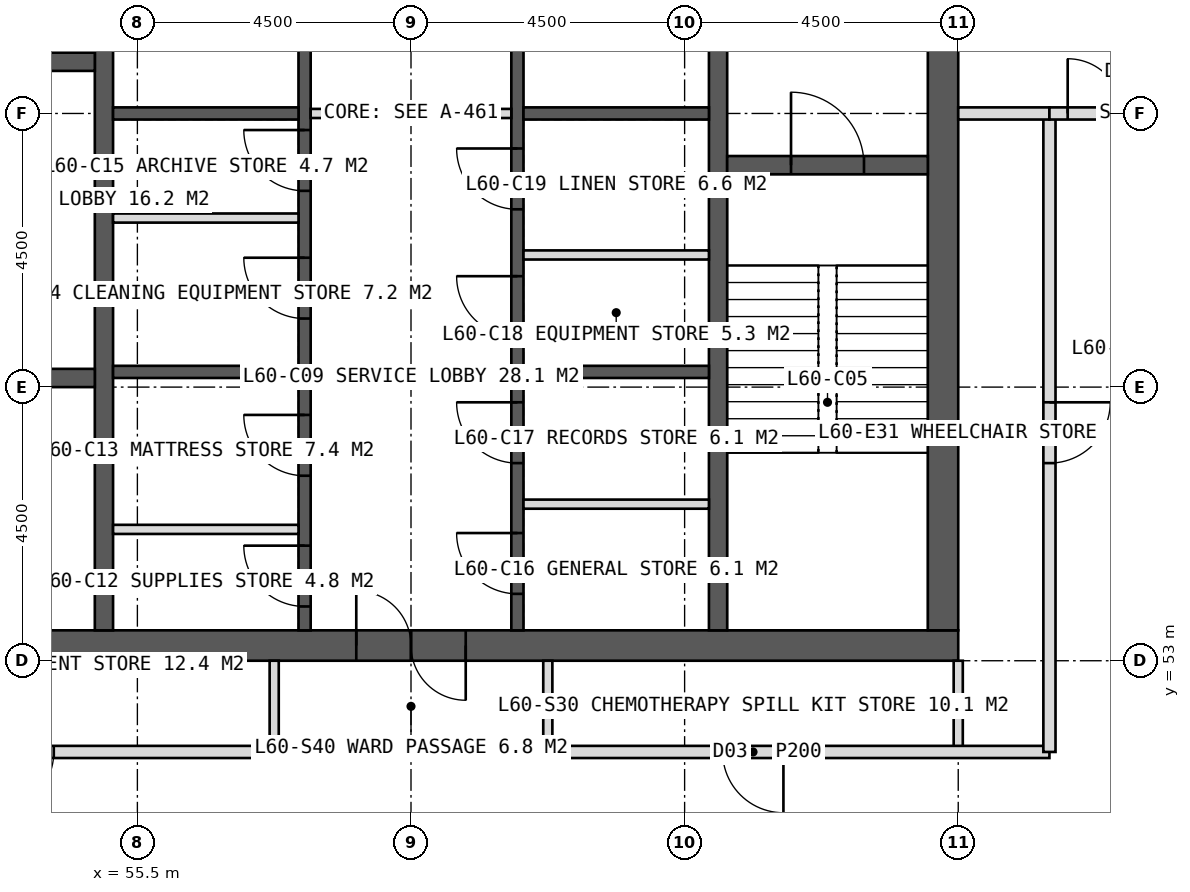
"""IFC4 building model, lengths in metres.
Left out: names, types, materials, properties, quantities, classifications, styles, units other than length and angle.
Written with IfcOpenShell. Run it as: python <this file> out.ifc"""

import sys

from ifc_helpers import new_model, si_unit, direction, frame, frame_2d, origin, place, context, subcontext, project, spatial, rectangle, extrude, element, fill, save


model = new_model("IFC4")
c1 = context("Model", 3, precision=1e-05, world=origin(), true_north=direction((0.0, 1.0)))
c2 = subcontext(c1, "Body", "Model", "MODEL_VIEW")
j1 = project(units=[si_unit("LENGTHUNIT", "METRE"), si_unit("PLANEANGLEUNIT", "RADIAN")], contexts=[c1])
p1 = place(None, origin())
s1 = spatial("IfcSite", under=j1, at=p1, CompositionType="ELEMENT")
p2 = place(p1, origin())
s2 = spatial("IfcBuilding", under=s1, at=p2, CompositionType="ELEMENT")
p3 = place(p2, frame((0.0, 0.0, 250.0)))
s3 = spatial("IfcBuildingStorey", under=s2, at=p3, CompositionType="ELEMENT", Elevation=250.0)
p4 = place(p3, frame((51.0, 53.25, 0.0), z_axis=(0.0, 0.0, 1.0), x_axis=(1.0, 0.0, 0.0)))
e1 = element("IfcWall", 1, at=p4, inside=s3, PredefinedType="SHEAR", context=c2, shape_type="SweptSolid", body=[
    extrude(rectangle(XDim=18.0, YDim=0.5, at=frame_2d((9.0, 0.0))), origin(), (0.0, 0.0, 1.0), 4.0),
])
p5 = place(p4, frame((8.1, 0.0, 0.0)))
e2 = element("IfcOpeningElement", 2, at=p5, cuts=e1, PredefinedType="OPENING", context=c2, shape_type="SweptSolid", body=[
    extrude(rectangle(XDim=1.8, YDim=2.2, at=frame_2d((0.9, 1.1))), frame((0.0, 0.26, 0.0), z_axis=(0.0, -1.0, 0.0), x_axis=(1.0, 0.0, 0.0)), (0.0, 0.0, 1.0), 0.52),
])
p6 = place(p3, frame((68.75, 53.5, 0.0), z_axis=(0.0, 0.0, 1.0), x_axis=(0.0, 1.0, 0.0)))
e3 = element("IfcWall", 3, at=p6, inside=s3, PredefinedType="SHEAR", context=c2, shape_type="SweptSolid", body=[
    extrude(rectangle(XDim=17.0, YDim=0.5, at=frame_2d((8.5, 0.0))), origin(), (0.0, 0.0, 1.0), 4.0),
])
p7 = place(p6, frame((9.6, 0.0, 0.0)))
e4 = element("IfcOpeningElement", 4, at=p7, cuts=e3, PredefinedType="OPENING", context=c2, shape_type="SweptSolid", body=[
    extrude(rectangle(XDim=1.5, YDim=2.2, at=frame_2d((0.75, 1.1))), frame((0.0, 0.26, 0.0), z_axis=(0.0, -1.0, 0.0), x_axis=(1.0, 0.0, 0.0)), (0.0, 0.0, 1.0), 0.52),
])
for number, where, z_axis, x_axis in (
    (5, (54.95, 53.5, 0.0), (0.0, 0.0, 1.0), (0.0, 1.0, 0.0)),
    (6, (65.05, 53.5, 0.0), (0.0, 0.0, 1.0), (0.0, 1.0, 0.0)),
):
    element("IfcWall", number, at=place(p3, frame(where, z_axis=z_axis, x_axis=x_axis)), inside=s3, PredefinedType="SHEAR", context=c2, shape_type="SweptSolid", body=[
        extrude(rectangle(XDim=17.0, YDim=0.3, at=frame_2d((8.5, 0.0))), origin(), (0.0, 0.0, 1.0), 4.0),
    ])
p8 = place(p3, frame((58.25, 53.5, 0.0), z_axis=(0.0, 0.0, 1.0), x_axis=(0.0, 1.0, 0.0)))
e7 = element("IfcWall", 7, at=p8, inside=s3, PredefinedType="SHEAR", context=c2, shape_type="SweptSolid", body=[
    extrude(rectangle(XDim=17.0, YDim=0.2, at=frame_2d((8.5, 0.0))), origin(), (0.0, 0.0, 1.0), 4.0),
])
p9 = place(p8, frame((0.393, 0.0, 0.0)))
e8 = element("IfcOpeningElement", 8, at=p9, cuts=e7, PredefinedType="OPENING", context=c2, shape_type="SweptSolid", body=[
    extrude(rectangle(XDim=1.0, YDim=2.1, at=frame_2d((0.5, 1.05))), frame((0.0, 0.11, 0.0), z_axis=(0.0, -1.0, 0.0), x_axis=(1.0, 0.0, 0.0)), (0.0, 0.0, 1.0), 0.22),
])
p10 = place(p8, frame((2.542, 0.0, 0.0)))
e9 = element("IfcOpeningElement", 9, at=p10, cuts=e7, PredefinedType="OPENING", context=c2, shape_type="SweptSolid", body=[
    extrude(rectangle(XDim=1.0, YDim=2.1, at=frame_2d((0.5, 1.05))), frame((0.0, 0.11, 0.0), z_axis=(0.0, -1.0, 0.0), x_axis=(1.0, 0.0, 0.0)), (0.0, 0.0, 1.0), 0.22),
])
p11 = place(p8, frame((5.127, 0.0, 0.0)))
e10 = element("IfcOpeningElement", 10, at=p11, cuts=e7, PredefinedType="OPENING", context=c2, shape_type="SweptSolid", body=[
    extrude(rectangle(XDim=1.0, YDim=2.1, at=frame_2d((0.5, 1.05))), frame((0.0, 0.11, 0.0), z_axis=(0.0, -1.0, 0.0), x_axis=(1.0, 0.0, 0.0)), (0.0, 0.0, 1.0), 0.22),
])
p12 = place(p8, frame((7.228, 0.0, 0.0)))
e11 = element("IfcOpeningElement", 11, at=p12, cuts=e7, PredefinedType="OPENING", context=c2, shape_type="SweptSolid", body=[
    extrude(rectangle(XDim=1.0, YDim=2.1, at=frame_2d((0.5, 1.05))), frame((0.0, 0.11, 0.0), z_axis=(0.0, -1.0, 0.0), x_axis=(1.0, 0.0, 0.0)), (0.0, 0.0, 1.0), 0.22),
])
p13 = place(p8, frame((10.025, 0.0, 0.0)))
e12 = element("IfcOpeningElement", 12, at=p13, cuts=e7, PredefinedType="OPENING", context=c2, shape_type="SweptSolid", body=[
    extrude(rectangle(XDim=1.4, YDim=2.2, at=frame_2d((0.7, 1.1))), frame((0.0, 0.11, 0.0), z_axis=(0.0, -1.0, 0.0), x_axis=(1.0, 0.0, 0.0)), (0.0, 0.0, 1.0), 0.22),
])
p14 = place(p8, frame((14.325, 0.0, 0.0)))
e13 = element("IfcOpeningElement", 13, at=p14, cuts=e7, PredefinedType="OPENING", context=c2, shape_type="SweptSolid", body=[
    extrude(rectangle(XDim=1.4, YDim=2.2, at=frame_2d((0.7, 1.1))), frame((0.0, 0.11, 0.0), z_axis=(0.0, -1.0, 0.0), x_axis=(1.0, 0.0, 0.0)), (0.0, 0.0, 1.0), 0.22),
])
p15 = place(p3, frame((61.75, 53.5, 0.0), z_axis=(0.0, 0.0, 1.0), x_axis=(0.0, 1.0, 0.0)))
e14 = element("IfcWall", 14, at=p15, inside=s3, PredefinedType="SHEAR", context=c2, shape_type="SweptSolid", body=[
    extrude(rectangle(XDim=17.0, YDim=0.2, at=frame_2d((8.5, 0.0))), origin(), (0.0, 0.0, 1.0), 4.0),
])
p16 = place(p15, frame((0.6, 0.0, 0.0)))
e15 = element("IfcOpeningElement", 15, at=p16, cuts=e14, PredefinedType="OPENING", context=c2, shape_type="SweptSolid", body=[
    extrude(rectangle(XDim=1.0, YDim=2.1, at=frame_2d((0.5, 1.05))), frame((0.0, 0.11, 0.0), z_axis=(0.0, -1.0, 0.0), x_axis=(1.0, 0.0, 0.0)), (0.0, 0.0, 1.0), 0.22),
])
p17 = place(p15, frame((2.75, 0.0, 0.0)))
e16 = element("IfcOpeningElement", 16, at=p17, cuts=e14, PredefinedType="OPENING", context=c2, shape_type="SweptSolid", body=[
    extrude(rectangle(XDim=1.0, YDim=2.1, at=frame_2d((0.5, 1.05))), frame((0.0, 0.11, 0.0), z_axis=(0.0, -1.0, 0.0), x_axis=(1.0, 0.0, 0.0)), (0.0, 0.0, 1.0), 0.22),
])
p18 = place(p15, frame((4.824, 0.0, 0.0)))
e17 = element("IfcOpeningElement", 17, at=p18, cuts=e14, PredefinedType="OPENING", context=c2, shape_type="SweptSolid", body=[
    extrude(rectangle(XDim=1.0, YDim=2.1, at=frame_2d((0.5, 1.05))), frame((0.0, 0.11, 0.0), z_axis=(0.0, -1.0, 0.0), x_axis=(1.0, 0.0, 0.0)), (0.0, 0.0, 1.0), 0.22),
])
p19 = place(p15, frame((6.924, 0.0, 0.0)))
e18 = element("IfcOpeningElement", 18, at=p19, cuts=e14, PredefinedType="OPENING", context=c2, shape_type="SweptSolid", body=[
    extrude(rectangle(XDim=1.0, YDim=2.1, at=frame_2d((0.5, 1.05))), frame((0.0, 0.11, 0.0), z_axis=(0.0, -1.0, 0.0), x_axis=(1.0, 0.0, 0.0)), (0.0, 0.0, 1.0), 0.22),
])
p20 = place(p15, frame((10.025, 0.0, 0.0)))
e19 = element("IfcOpeningElement", 19, at=p20, cuts=e14, PredefinedType="OPENING", context=c2, shape_type="SweptSolid", body=[
    extrude(rectangle(XDim=1.4, YDim=2.2, at=frame_2d((0.7, 1.1))), frame((0.0, 0.11, 0.0), z_axis=(0.0, -1.0, 0.0), x_axis=(1.0, 0.0, 0.0)), (0.0, 0.0, 1.0), 0.22),
])
p21 = place(p15, frame((14.325, 0.0, 0.0)))
e20 = element("IfcOpeningElement", 20, at=p21, cuts=e14, PredefinedType="OPENING", context=c2, shape_type="SweptSolid", body=[
    extrude(rectangle(XDim=1.4, YDim=2.2, at=frame_2d((0.7, 1.1))), frame((0.0, 0.11, 0.0), z_axis=(0.0, -1.0, 0.0), x_axis=(1.0, 0.0, 0.0)), (0.0, 0.0, 1.0), 0.22),
])
for number, where, z_axis, x_axis in (
    (21, (55.1, 57.75, 0.0), (0.0, 0.0, 1.0), (1.0, 0.0, 0.0)),
    (22, (61.85, 57.75, 0.0), (0.0, 0.0, 1.0), (1.0, 0.0, 0.0)),
    (23, (55.1, 62.0, 0.0), (0.0, 0.0, 1.0), (1.0, 0.0, 0.0)),
    (24, (61.85, 62.0, 0.0), (0.0, 0.0, 1.0), (1.0, 0.0, 0.0)),
):
    element("IfcWall", number, at=place(p3, frame(where, z_axis=z_axis, x_axis=x_axis)), inside=s3, PredefinedType="SHEAR", context=c2, shape_type="SweptSolid", body=[
        extrude(rectangle(XDim=3.05, YDim=0.2, at=frame_2d((1.525, 0.0))), origin(), (0.0, 0.0, 1.0), 4.0),
    ])
p22 = place(p3, frame((51.5, 62.85, 0.0), z_axis=(0.0, 0.0, 1.0), x_axis=(1.0, 0.0, 0.0)))
e25 = element("IfcWall", 25, at=p22, inside=s3, PredefinedType="SHEAR", context=c2, shape_type="SweptSolid", body=[
    extrude(rectangle(XDim=3.3, YDim=0.3, at=frame_2d((1.65, 0.0))), origin(), (0.0, 0.0, 1.0), 4.0),
])
p23 = place(p22, frame((1.15, 0.0, 0.0)))
e26 = element("IfcOpeningElement", 26, at=p23, cuts=e25, PredefinedType="OPENING", context=c2, shape_type="SweptSolid", body=[
    extrude(rectangle(XDim=1.2, YDim=2.1, at=frame_2d((0.6, 1.05))), frame((0.0, 0.16, 0.0), z_axis=(0.0, -1.0, 0.0), x_axis=(1.0, 0.0, 0.0)), (0.0, 0.0, 1.0), 0.32),
])
p24 = place(p3, frame((51.5, 57.65, 0.0), z_axis=(0.0, 0.0, 1.0), x_axis=(1.0, 0.0, 0.0)))
e27 = element("IfcWall", 27, at=p24, inside=s3, PredefinedType="SHEAR", context=c2, shape_type="SweptSolid", body=[
    extrude(rectangle(XDim=3.3, YDim=0.3, at=frame_2d((1.65, 0.0))), origin(), (0.0, 0.0, 1.0), 4.0),
])
p25 = place(p24, frame((1.15, 0.0, 0.0)))
e28 = element("IfcOpeningElement", 28, at=p25, cuts=e27, PredefinedType="OPENING", context=c2, shape_type="SweptSolid", body=[
    extrude(rectangle(XDim=1.2, YDim=2.2, at=frame_2d((0.6, 1.1))), frame((0.0, 0.16, 0.0), z_axis=(0.0, -1.0, 0.0), x_axis=(1.0, 0.0, 0.0)), (0.0, 0.0, 1.0), 0.32),
])
p26 = place(p3, frame((65.2, 61.15, 0.0), z_axis=(0.0, 0.0, 1.0), x_axis=(1.0, 0.0, 0.0)))
e29 = element("IfcWall", 29, at=p26, inside=s3, PredefinedType="SHEAR", context=c2, shape_type="SweptSolid", body=[
    extrude(rectangle(XDim=3.3, YDim=0.3, at=frame_2d((1.65, 0.0))), origin(), (0.0, 0.0, 1.0), 4.0),
])
p27 = place(p26, frame((1.05, 0.0, 0.0)))
e30 = element("IfcOpeningElement", 30, at=p27, cuts=e29, PredefinedType="OPENING", context=c2, shape_type="SweptSolid", body=[
    extrude(rectangle(XDim=1.2, YDim=2.1, at=frame_2d((0.6, 1.05))), frame((0.0, 0.16, 0.0), z_axis=(0.0, -1.0, 0.0), x_axis=(1.0, 0.0, 0.0)), (0.0, 0.0, 1.0), 0.32),
])
p28 = place(p3, frame((69.0, 53.0, 0.0), z_axis=(0.0, 0.0, 1.0), x_axis=(0.0, -1.0, 0.0)))
e31 = element("IfcWall", 31, at=p28, inside=s3, PredefinedType="PARTITIONING", context=c2, shape_type="SweptSolid", body=[
    extrude(rectangle(XDim=1.5, YDim=0.15, at=frame_2d((0.75, 0.0))), origin(), (0.0, 0.0, 1.0), 3.75),
])
p29 = place(p3, frame((70.5, 51.5, 0.0), z_axis=(0.0, 0.0, 1.0), x_axis=(-1.0, 0.0, 0.0)))
e32 = element("IfcWall", 32, at=p29, inside=s3, PredefinedType="PARTITIONING", context=c2, shape_type="SweptSolid", body=[
    extrude(rectangle(XDim=8.25, YDim=0.2, at=frame_2d((4.125, 0.0))), origin(), (0.0, 0.0, 1.0), 3.75),
])
p30 = place(p29, frame((4.375, 0.0, 0.0)))
e33 = element("IfcOpeningElement", 33, at=p30, cuts=e32, PredefinedType="OPENING", context=c2, shape_type="SweptSolid", body=[
    extrude(rectangle(XDim=1.0, YDim=2.1, at=frame_2d((0.5, 1.05))), frame((0.0, 0.11, 0.0), z_axis=(0.0, -1.0, 0.0), x_axis=(1.0, 0.0, 0.0)), (0.0, 0.0, 1.0), 0.22),
])
p31 = place(p3, frame((57.75, 51.5, 0.0), z_axis=(0.0, 0.0, 1.0), x_axis=(-1.0, 0.0, 0.0)))
e34 = element("IfcWall", 34, at=p31, inside=s3, PredefinedType="PARTITIONING", context=c2, shape_type="SweptSolid", body=[
    extrude(rectangle(XDim=8.25, YDim=0.2, at=frame_2d((4.125, 0.0))), origin(), (0.0, 0.0, 1.0), 3.75),
])
p32 = place(p31, frame((3.625, 0.0, 0.0)))
e35 = element("IfcOpeningElement", 35, at=p32, cuts=e34, PredefinedType="OPENING", context=c2, shape_type="SweptSolid", body=[
    extrude(rectangle(XDim=1.0, YDim=2.1, at=frame_2d((0.5, 1.05))), frame((0.0, 0.11, 0.0), z_axis=(0.0, -1.0, 0.0), x_axis=(1.0, 0.0, 0.0)), (0.0, 0.0, 1.0), 0.22),
])
for number, where, z_axis, x_axis in (
    (36, (62.25, 53.0, 0.0), (0.0, 0.0, 1.0), (0.0, -1.0, 0.0)),
    (37, (57.75, 53.0, 0.0), (0.0, 0.0, 1.0), (0.0, -1.0, 0.0)),
):
    element("IfcWall", number, at=place(p3, frame(where, z_axis=z_axis, x_axis=x_axis)), inside=s3, PredefinedType="PARTITIONING", context=c2, shape_type="SweptSolid", body=[
        extrude(rectangle(XDim=1.5, YDim=0.15, at=frame_2d((0.75, 0.0))), origin(), (0.0, 0.0, 1.0), 3.75),
    ])
p33 = place(p3, frame((70.5, 62.0, 0.0), z_axis=(0.0, 0.0, 1.0), x_axis=(0.0, -1.0, 0.0)))
e38 = element("IfcWall", 38, at=p33, inside=s3, PredefinedType="PARTITIONING", context=c2, shape_type="SweptSolid", body=[
    extrude(rectangle(XDim=10.5, YDim=0.2, at=frame_2d((5.25, 0.0))), origin(), (0.0, 0.0, 1.0), 3.75),
])
p34 = place(p33, frame((4.75, 0.0, 0.0)))
e39 = element("IfcOpeningElement", 39, at=p34, cuts=e38, PredefinedType="OPENING", context=c2, shape_type="SweptSolid", body=[
    extrude(rectangle(XDim=1.0, YDim=2.1, at=frame_2d((0.5, 1.05))), frame((0.0, 0.11, 0.0), z_axis=(0.0, -1.0, 0.0), x_axis=(1.0, 0.0, 0.0)), (0.0, 0.0, 1.0), 0.22),
])
p35 = place(p3, frame((69.0, 62.0, 0.0), z_axis=(0.0, 0.0, 1.0), x_axis=(1.0, 0.0, 0.0)))
e40 = element("IfcWall", 40, at=p35, inside=s3, PredefinedType="SOLIDWALL", context=c2, shape_type="SweptSolid", body=[
    extrude(rectangle(XDim=1.5, YDim=0.2, at=frame_2d((0.75, 0.0))), origin(), (0.0, 0.0, 1.0), 2.75),
])
p36 = place(p3, frame((70.5, 62.0, 0.0), z_axis=(0.0, 0.0, 1.0), x_axis=(1.0, 0.0, 0.0)))
e41 = element("IfcWall", 41, at=p36, inside=s3, PredefinedType="SOLIDWALL", context=c2, shape_type="SweptSolid", body=[
    extrude(rectangle(XDim=2.6, YDim=0.2, at=frame_2d((1.3, 0.0))), origin(), (0.0, 0.0, 1.0), 2.75),
])
p37 = place(p36, frame((0.3, 0.0, 0.0)))
e42 = element("IfcOpeningElement", 42, at=p37, cuts=e41, PredefinedType="OPENING", context=c2, shape_type="SweptSolid", body=[
    extrude(rectangle(XDim=1.8, YDim=2.2, at=frame_2d((0.9, 1.1))), frame((0.0, 0.11, 0.0), z_axis=(0.0, -1.0, 0.0), x_axis=(1.0, 0.0, 0.0)), (0.0, 0.0, 1.0), 0.22),
])
for number, where, z_axis, x_axis in (
    (43, (55.1, 55.16, 0.0), (0.0, 0.0, 1.0), (1.0, 0.0, 0.0)),
    (44, (61.85, 55.575, 0.0), (0.0, 0.0, 1.0), (1.0, 0.0, 0.0)),
    (45, (55.1, 60.28, 0.0), (0.0, 0.0, 1.0), (1.0, 0.0, 0.0)),
    (46, (61.85, 59.673, 0.0), (0.0, 0.0, 1.0), (1.0, 0.0, 0.0)),
):
    element("IfcWall", number, at=place(p3, frame(where, z_axis=z_axis, x_axis=x_axis)), inside=s3, PredefinedType="PARTITIONING", context=c2, shape_type="SweptSolid", body=[
        extrude(rectangle(XDim=3.05, YDim=0.15, at=frame_2d((1.525, 0.0))), origin(), (0.0, 0.0, 1.0), 3.75),
    ])
p38 = place(p3, frame((58.35, 62.0, 0.0), z_axis=(0.0, 0.0, 1.0), x_axis=(1.0, 0.0, 0.0)))
e47 = element("IfcWall", 47, at=p38, inside=s3, PredefinedType="PARTITIONING", context=c2, shape_type="SweptSolid", body=[
    extrude(rectangle(XDim=3.3, YDim=0.15, at=frame_2d((1.65, 0.0))), origin(), (0.0, 0.0, 1.0), 3.75),
])
p39 = place(p30, origin())
e48 = element("IfcDoor", 48, at=p39, inside=s3, OperationType="SINGLE_SWING_LEFT", PredefinedType="DOOR", context=c2, shape_type="SweptSolid", body=[
    extrude(rectangle(XDim=1.0, YDim=2.1, at=frame_2d((0.5, 1.05))), frame((0.0, 0.025, 0.0), z_axis=(0.0, -1.0, 0.0), x_axis=(1.0, 0.0, 0.0)), (0.0, 0.0, 1.0), 0.05),
])
fill(e33, e48)
p40 = place(p32, origin())
e49 = element("IfcDoor", 49, at=p40, inside=s3, OperationType="SINGLE_SWING_RIGHT", PredefinedType="DOOR", context=c2, shape_type="SweptSolid", body=[
    extrude(rectangle(XDim=1.0, YDim=2.1, at=frame_2d((0.5, 1.05))), frame((0.0, 0.025, 0.0), z_axis=(0.0, -1.0, 0.0), x_axis=(1.0, 0.0, 0.0)), (0.0, 0.0, 1.0), 0.05),
])
fill(e35, e49)
p41 = place(p34, origin())
e50 = element("IfcDoor", 50, at=p41, inside=s3, OperationType="SINGLE_SWING_LEFT", PredefinedType="DOOR", context=c2, shape_type="SweptSolid", body=[
    extrude(rectangle(XDim=1.0, YDim=2.1, at=frame_2d((0.5, 1.05))), frame((0.0, 0.025, 0.0), z_axis=(0.0, -1.0, 0.0), x_axis=(1.0, 0.0, 0.0)), (0.0, 0.0, 1.0), 0.05),
])
fill(e39, e50)
p42 = place(p37, origin())
e51 = element("IfcDoor", 51, at=p42, inside=s3, OperationType="DOUBLE_DOOR_DOUBLE_SWING", PredefinedType="DOOR", context=c2, shape_type="SweptSolid", body=[
    extrude(rectangle(XDim=1.8, YDim=2.2, at=frame_2d((0.9, 1.1))), frame((0.0, 0.025, 0.0), z_axis=(0.0, -1.0, 0.0), x_axis=(1.0, 0.0, 0.0)), (0.0, 0.0, 1.0), 0.05),
])
fill(e42, e51)
p43 = place(p27, origin())
e52 = element("IfcDoor", 52, at=p43, inside=s3, OperationType="SINGLE_SWING_LEFT", PredefinedType="DOOR", context=c2, shape_type="SweptSolid", body=[
    extrude(rectangle(XDim=1.2, YDim=2.1, at=frame_2d((0.6, 1.05))), frame((0.0, 0.025, 0.0), z_axis=(0.0, -1.0, 0.0), x_axis=(1.0, 0.0, 0.0)), (0.0, 0.0, 1.0), 0.05),
])
fill(e30, e52)
p44 = place(p9, origin())
e53 = element("IfcDoor", 53, at=p44, inside=s3, OperationType="SINGLE_SWING_RIGHT", PredefinedType="DOOR", context=c2, shape_type="SweptSolid", body=[
    extrude(rectangle(XDim=1.0, YDim=2.1, at=frame_2d((0.5, 1.05))), frame((0.0, 0.025, 0.0), z_axis=(0.0, -1.0, 0.0), x_axis=(1.0, 0.0, 0.0)), (0.0, 0.0, 1.0), 0.05),
])
fill(e8, e53)
p45 = place(p10, origin())
e54 = element("IfcDoor", 54, at=p45, inside=s3, OperationType="SINGLE_SWING_RIGHT", PredefinedType="DOOR", context=c2, shape_type="SweptSolid", body=[
    extrude(rectangle(XDim=1.0, YDim=2.1, at=frame_2d((0.5, 1.05))), frame((0.0, 0.025, 0.0), z_axis=(0.0, -1.0, 0.0), x_axis=(1.0, 0.0, 0.0)), (0.0, 0.0, 1.0), 0.05),
])
fill(e9, e54)
p46 = place(p16, origin())
e55 = element("IfcDoor", 55, at=p46, inside=s3, OperationType="SINGLE_SWING_RIGHT", PredefinedType="DOOR", context=c2, shape_type="SweptSolid", body=[
    extrude(rectangle(XDim=1.0, YDim=2.1, at=frame_2d((0.5, 1.05))), frame((0.0, 0.025, 0.0), z_axis=(0.0, -1.0, 0.0), x_axis=(1.0, 0.0, 0.0)), (0.0, 0.0, 1.0), 0.05),
])
fill(e15, e55)
p47 = place(p17, origin())
e56 = element("IfcDoor", 56, at=p47, inside=s3, OperationType="SINGLE_SWING_RIGHT", PredefinedType="DOOR", context=c2, shape_type="SweptSolid", body=[
    extrude(rectangle(XDim=1.0, YDim=2.1, at=frame_2d((0.5, 1.05))), frame((0.0, 0.025, 0.0), z_axis=(0.0, -1.0, 0.0), x_axis=(1.0, 0.0, 0.0)), (0.0, 0.0, 1.0), 0.05),
])
fill(e16, e56)
p48 = place(p11, origin())
e57 = element("IfcDoor", 57, at=p48, inside=s3, OperationType="SINGLE_SWING_RIGHT", PredefinedType="DOOR", context=c2, shape_type="SweptSolid", body=[
    extrude(rectangle(XDim=1.0, YDim=2.1, at=frame_2d((0.5, 1.05))), frame((0.0, 0.025, 0.0), z_axis=(0.0, -1.0, 0.0), x_axis=(1.0, 0.0, 0.0)), (0.0, 0.0, 1.0), 0.05),
])
fill(e10, e57)
p49 = place(p12, origin())
e58 = element("IfcDoor", 58, at=p49, inside=s3, OperationType="SINGLE_SWING_RIGHT", PredefinedType="DOOR", context=c2, shape_type="SweptSolid", body=[
    extrude(rectangle(XDim=1.0, YDim=2.1, at=frame_2d((0.5, 1.05))), frame((0.0, 0.025, 0.0), z_axis=(0.0, -1.0, 0.0), x_axis=(1.0, 0.0, 0.0)), (0.0, 0.0, 1.0), 0.05),
])
fill(e11, e58)
p50 = place(p18, origin())
e59 = element("IfcDoor", 59, at=p50, inside=s3, OperationType="SINGLE_SWING_RIGHT", PredefinedType="DOOR", context=c2, shape_type="SweptSolid", body=[
    extrude(rectangle(XDim=1.0, YDim=2.1, at=frame_2d((0.5, 1.05))), frame((0.0, 0.025, 0.0), z_axis=(0.0, -1.0, 0.0), x_axis=(1.0, 0.0, 0.0)), (0.0, 0.0, 1.0), 0.05),
])
fill(e17, e59)
p51 = place(p19, origin())
e60 = element("IfcDoor", 60, at=p51, inside=s3, OperationType="SINGLE_SWING_RIGHT", PredefinedType="DOOR", context=c2, shape_type="SweptSolid", body=[
    extrude(rectangle(XDim=1.0, YDim=2.1, at=frame_2d((0.5, 1.05))), frame((0.0, 0.025, 0.0), z_axis=(0.0, -1.0, 0.0), x_axis=(1.0, 0.0, 0.0)), (0.0, 0.0, 1.0), 0.05),
])
fill(e18, e60)
p52 = place(p5, origin())
e61 = element("IfcDoor", 61, at=p52, inside=s3, OperationType="DOUBLE_DOOR_SINGLE_SWING", PredefinedType="DOOR", context=c2, shape_type="SweptSolid", body=[
    extrude(rectangle(XDim=1.8, YDim=2.2, at=frame_2d((0.9, 1.1))), frame((0.0, 0.025, 0.0), z_axis=(0.0, -1.0, 0.0), x_axis=(1.0, 0.0, 0.0)), (0.0, 0.0, 1.0), 0.05),
])
fill(e2, e61)
save(model, sys.argv[1])
